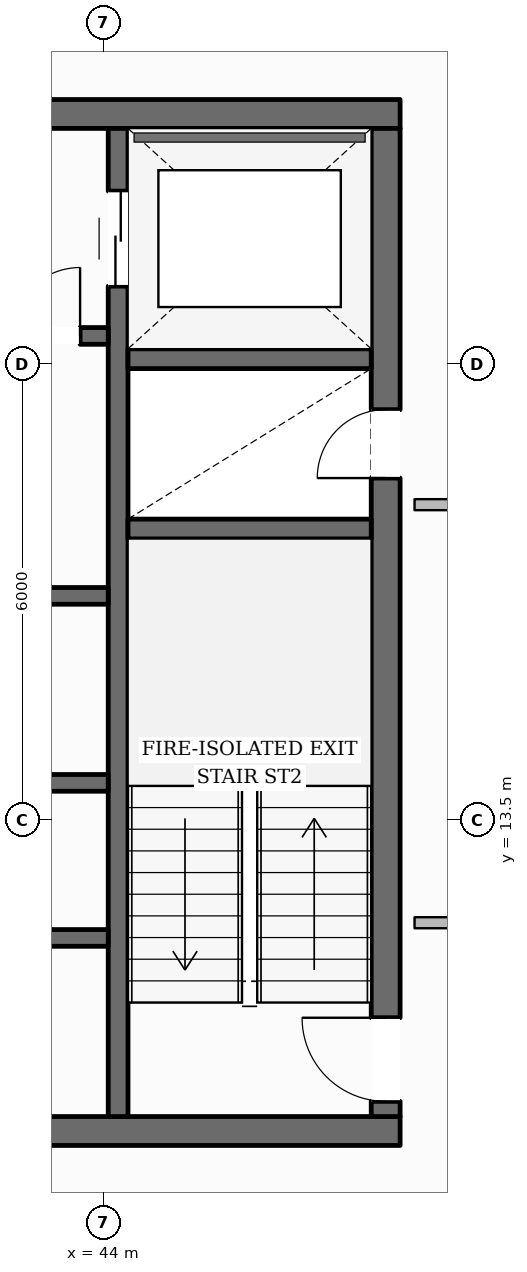
"""IFC4 building model, lengths in metres.
Left out: names, types, materials, properties, quantities, classifications, styles, units other than length and angle.
Written with IfcOpenShell. Run it as: python <this file> out.ifc"""

import sys

from ifc_helpers import new_model, si_unit, direction, frame, frame_2d, origin, place, context, subcontext, project, spatial, rectangle, extrude, element, fill, save


model = new_model("IFC4")
c1 = context("Model", 3, precision=1e-05, world=origin(), true_north=direction((0.0, 1.0)))
c2 = subcontext(c1, "Body", "Model", "MODEL_VIEW")
j1 = project(units=[si_unit("LENGTHUNIT", "METRE"), si_unit("PLANEANGLEUNIT", "RADIAN")], contexts=[c1])
p1 = place(None, origin())
s1 = spatial("IfcSite", under=j1, at=p1, CompositionType="ELEMENT")
p2 = place(p1, origin())
s2 = spatial("IfcBuilding", under=s1, at=p2, CompositionType="ELEMENT")
p3 = place(p2, frame((0.0, 0.0, 243.35)))
s3 = spatial("IfcBuildingStorey", under=s2, at=p3, CompositionType="ELEMENT", Elevation=243.35)
p4 = place(p3, frame((28.1, 9.41, 0.0), z_axis=(0.0, 0.0, 1.0), x_axis=(1.0, 0.0, 0.0)))
e1 = element("IfcWall", 1, at=p4, inside=s3, PredefinedType="SOLIDWALL", context=c2, shape_type="SweptSolid", body=[
    extrude(rectangle(XDim=19.8, YDim=0.38, at=frame_2d((9.9, 0.0))), origin(), (0.0, 0.0, 1.0), 3.61),
])
p5 = place(p4, frame((10.4, 0.0, 0.0)))
e2 = element("IfcOpeningElement", 2, at=p5, cuts=e1, PredefinedType="OPENING", context=c2, shape_type="SweptSolid", body=[
    extrude(rectangle(XDim=1.4, YDim=2.2, at=frame_2d((0.7, 1.1))), frame((0.0, 0.2, 0.0), z_axis=(0.0, -1.0, 0.0), x_axis=(1.0, 0.0, 0.0)), (0.0, 0.0, 1.0), 0.4),
])
p6 = place(p3, frame((28.1, 22.79, 0.0), z_axis=(0.0, 0.0, 1.0), x_axis=(1.0, 0.0, 0.0)))
e3 = element("IfcWall", 3, at=p6, inside=s3, PredefinedType="SOLIDWALL", context=c2, shape_type="SweptSolid", body=[
    extrude(rectangle(XDim=19.8, YDim=0.38, at=frame_2d((9.9, 0.0))), origin(), (0.0, 0.0, 1.0), 3.61),
])
p7 = place(p6, frame((6.175, 0.0, 0.0)))
e4 = element("IfcOpeningElement", 4, at=p7, cuts=e3, PredefinedType="OPENING", context=c2, shape_type="SweptSolid", body=[
    extrude(rectangle(XDim=1.05, YDim=2.15, at=frame_2d((0.525, 1.075))), frame((0.0, 0.2, 0.0), z_axis=(0.0, -1.0, 0.0), x_axis=(1.0, 0.0, 0.0)), (0.0, 0.0, 1.0), 0.4),
])
p8 = place(p6, frame((12.575, 0.0, 0.0)))
e5 = element("IfcOpeningElement", 5, at=p8, cuts=e3, PredefinedType="OPENING", context=c2, shape_type="SweptSolid", body=[
    extrude(rectangle(XDim=1.05, YDim=2.15, at=frame_2d((0.525, 1.075))), frame((0.0, 0.2, 0.0), z_axis=(0.0, -1.0, 0.0), x_axis=(1.0, 0.0, 0.0)), (0.0, 0.0, 1.0), 0.4),
])
p9 = place(p3, frame((47.71, 9.6, 0.0), z_axis=(0.0, 0.0, 1.0), x_axis=(0.0, 1.0, 0.0)))
e6 = element("IfcWall", 6, at=p9, inside=s3, PredefinedType="SOLIDWALL", context=c2, shape_type="SweptSolid", body=[
    extrude(rectangle(XDim=13.0, YDim=0.38, at=frame_2d((6.5, 0.0))), origin(), (0.0, 0.0, 1.0), 3.61),
])
p10 = place(p9, frame((0.2, 0.0, 0.0)))
e7 = element("IfcOpeningElement", 7, at=p10, cuts=e6, PredefinedType="OPENING", context=c2, shape_type="SweptSolid", body=[
    extrude(rectangle(XDim=1.1, YDim=2.15, at=frame_2d((0.55, 1.075))), frame((0.0, 0.2, 0.0), z_axis=(0.0, -1.0, 0.0), x_axis=(1.0, 0.0, 0.0)), (0.0, 0.0, 1.0), 0.4),
])
p11 = place(p9, frame((8.4, 0.0, 0.0)))
e8 = element("IfcOpeningElement", 8, at=p11, cuts=e6, PredefinedType="OPENING", context=c2, shape_type="SweptSolid", body=[
    extrude(rectangle(XDim=0.9, YDim=2.1, at=frame_2d((0.45, 1.05))), frame((0.0, 0.2, 0.0), z_axis=(0.0, -1.0, 0.0), x_axis=(1.0, 0.0, 0.0)), (0.0, 0.0, 1.0), 0.4),
])
p12 = place(p3, frame((44.19, 9.6, 0.0), z_axis=(0.0, 0.0, 1.0), x_axis=(0.0, 1.0, 0.0)))
e9 = element("IfcWall", 9, at=p12, inside=s3, PredefinedType="SHEAR", context=c2, shape_type="SweptSolid", body=[
    extrude(rectangle(XDim=13.0, YDim=0.26, at=frame_2d((6.5, 0.0))), origin(), (0.0, 0.0, 1.0), 3.61),
])
p13 = place(p12, frame((10.925, 0.0, 0.0)))
e10 = element("IfcOpeningElement", 10, at=p13, cuts=e9, PredefinedType="OPENING", context=c2, shape_type="SweptSolid", body=[
    extrude(rectangle(XDim=1.25, YDim=2.25, at=frame_2d((0.625, 1.125))), frame((0.0, 0.14, 0.0), z_axis=(0.0, -1.0, 0.0), x_axis=(1.0, 0.0, 0.0)), (0.0, 0.0, 1.0), 0.28),
])
for number, where, z_axis, x_axis in (
    (11, (44.32, 17.33, 0.0), (0.0, 0.0, 1.0), (1.0, 0.0, 0.0)),
    (12, (44.32, 19.57, 0.0), (0.0, 0.0, 1.0), (1.0, 0.0, 0.0)),
):
    element("IfcWall", number, at=place(p3, frame(where, z_axis=z_axis, x_axis=x_axis)), inside=s3, PredefinedType="SHEAR", context=c2, shape_type="SweptSolid", body=[
        extrude(rectangle(XDim=3.2, YDim=0.26, at=frame_2d((1.6, 0.0))), origin(), (0.0, 0.0, 1.0), 3.61),
    ])
p14 = place(p3, frame((31.94, 19.87, 0.0), z_axis=(0.0, 0.0, 1.0), x_axis=(1.0, 0.0, 0.0)))
e13 = element("IfcWall", 13, at=p14, inside=s3, PredefinedType="SOLIDWALL", context=c2, shape_type="SweptSolid", body=[
    extrude(rectangle(XDim=12.12, YDim=0.22, at=frame_2d((6.06, 0.0))), origin(), (0.0, 0.0, 1.0), 3.61),
])
p15 = place(p14, frame((6.3, 0.0, 0.0)))
e14 = element("IfcOpeningElement", 14, at=p15, cuts=e13, PredefinedType="OPENING", context=c2, shape_type="SweptSolid", body=[
    extrude(rectangle(XDim=1.1, YDim=2.15, at=frame_2d((0.55, 1.075))), frame((0.0, 0.12, 0.0), z_axis=(0.0, -1.0, 0.0), x_axis=(1.0, 0.0, 0.0)), (0.0, 0.0, 1.0), 0.24),
])
p16 = place(p14, frame((8.61, 0.0, 0.0)))
e15 = element("IfcOpeningElement", 15, at=p16, cuts=e13, PredefinedType="OPENING", context=c2, shape_type="SweptSolid", body=[
    extrude(rectangle(XDim=0.9, YDim=2.1, at=frame_2d((0.45, 1.05))), frame((0.0, 0.12, 0.0), z_axis=(0.0, -1.0, 0.0), x_axis=(1.0, 0.0, 0.0)), (0.0, 0.0, 1.0), 0.24),
])
p17 = place(p14, frame((10.85, 0.0, 0.0)))
e16 = element("IfcOpeningElement", 16, at=p17, cuts=e13, PredefinedType="OPENING", context=c2, shape_type="SweptSolid", body=[
    extrude(rectangle(XDim=0.9, YDim=2.1, at=frame_2d((0.45, 1.05))), frame((0.0, 0.12, 0.0), z_axis=(0.0, -1.0, 0.0), x_axis=(1.0, 0.0, 0.0)), (0.0, 0.0, 1.0), 0.24),
])
p18 = place(p3, frame((31.94, 16.45, 0.0), z_axis=(0.0, 0.0, 1.0), x_axis=(1.0, 0.0, 0.0)))
e17 = element("IfcWall", 17, at=p18, inside=s3, PredefinedType="SOLIDWALL", context=c2, shape_type="SweptSolid", body=[
    extrude(rectangle(XDim=12.12, YDim=0.22, at=frame_2d((6.06, 0.0))), origin(), (0.0, 0.0, 1.0), 3.61),
])
p19 = place(p3, frame((31.94, 13.99, 0.0), z_axis=(0.0, 0.0, 1.0), x_axis=(1.0, 0.0, 0.0)))
e18 = element("IfcWall", 18, at=p19, inside=s3, PredefinedType="SOLIDWALL", context=c2, shape_type="SweptSolid", body=[
    extrude(rectangle(XDim=12.12, YDim=0.22, at=frame_2d((6.06, 0.0))), origin(), (0.0, 0.0, 1.0), 3.61),
])
p20 = place(p19, frame((1.11, 0.0, 0.0)))
e19 = element("IfcOpeningElement", 19, at=p20, cuts=e18, PredefinedType="OPENING", context=c2, shape_type="SweptSolid", body=[
    extrude(rectangle(XDim=0.9, YDim=2.1, at=frame_2d((0.45, 1.05))), frame((0.0, 0.12, 0.0), z_axis=(0.0, -1.0, 0.0), x_axis=(1.0, 0.0, 0.0)), (0.0, 0.0, 1.0), 0.24),
])
p21 = place(p19, frame((5.16, 0.0, 0.0)))
e20 = element("IfcOpeningElement", 20, at=p21, cuts=e18, PredefinedType="OPENING", context=c2, shape_type="SweptSolid", body=[
    extrude(rectangle(XDim=0.9, YDim=2.1, at=frame_2d((0.45, 1.05))), frame((0.0, 0.12, 0.0), z_axis=(0.0, -1.0, 0.0), x_axis=(1.0, 0.0, 0.0)), (0.0, 0.0, 1.0), 0.24),
])
p22 = place(p19, frame((9.61, 0.0, 0.0)))
e21 = element("IfcOpeningElement", 21, at=p22, cuts=e18, PredefinedType="OPENING", context=c2, shape_type="SweptSolid", body=[
    extrude(rectangle(XDim=0.9, YDim=2.1, at=frame_2d((0.45, 1.05))), frame((0.0, 0.12, 0.0), z_axis=(0.0, -1.0, 0.0), x_axis=(1.0, 0.0, 0.0)), (0.0, 0.0, 1.0), 0.24),
])
p23 = place(p3, frame((40.28, 11.95, 0.0), z_axis=(0.0, 0.0, 1.0), x_axis=(1.0, 0.0, 0.0)))
e22 = element("IfcWall", 22, at=p23, inside=s3, PredefinedType="SOLIDWALL", context=c2, shape_type="SweptSolid", body=[
    extrude(rectangle(XDim=3.78, YDim=0.22, at=frame_2d((1.89, 0.0))), origin(), (0.0, 0.0, 1.0), 3.61),
])
p24 = place(p23, frame((1.55, 0.0, 0.0)))
e23 = element("IfcOpeningElement", 23, at=p24, cuts=e22, PredefinedType="OPENING", context=c2, shape_type="SweptSolid", body=[
    extrude(rectangle(XDim=0.9, YDim=2.1, at=frame_2d((0.45, 1.05))), frame((0.0, 0.12, 0.0), z_axis=(0.0, -1.0, 0.0), x_axis=(1.0, 0.0, 0.0)), (0.0, 0.0, 1.0), 0.24),
])
p25 = place(p3, frame((41.362, 44.097, 0.0), z_axis=(0.0, 0.0, 1.0), x_axis=(0.497556414716, -0.867431619308, 0.0)))
e24 = element("IfcWall", 24, at=p25, inside=s3, PredefinedType="STANDARD", context=c2, shape_type="SweptSolid", body=[
    extrude(rectangle(XDim=38.118, YDim=0.35, at=frame_2d((19.059, 0.0))), origin(), (0.0, 0.0, 1.0), 3.196),
])
p26 = place(p25, frame((33.873, 0.0, 0.65)))
e25 = element("IfcOpeningElement", 25, at=p26, cuts=e24, PredefinedType="OPENING", context=c2, shape_type="SweptSolid", body=[
    extrude(rectangle(XDim=1.35, YDim=1.75, at=frame_2d((0.675, 0.875))), frame((0.0, 0.185, 0.0), z_axis=(0.0, -1.0, 0.0), x_axis=(1.0, 0.0, 0.0)), (0.0, 0.0, 1.0), 0.37),
])
p27 = place(p25, frame((27.678, 0.0, 0.65)))
e26 = element("IfcOpeningElement", 26, at=p27, cuts=e24, PredefinedType="OPENING", context=c2, shape_type="SweptSolid", body=[
    extrude(rectangle(XDim=1.35, YDim=1.75, at=frame_2d((0.675, 0.875))), frame((0.0, 0.185, 0.0), z_axis=(0.0, -1.0, 0.0), x_axis=(1.0, 0.0, 0.0)), (0.0, 0.0, 1.0), 0.37),
])
p28 = place(p25, frame((15.288, 0.0, 0.65)))
e27 = element("IfcOpeningElement", 27, at=p28, cuts=e24, PredefinedType="OPENING", context=c2, shape_type="SweptSolid", body=[
    extrude(rectangle(XDim=1.35, YDim=1.75, at=frame_2d((0.675, 0.875))), frame((0.0, 0.185, 0.0), z_axis=(0.0, -1.0, 0.0), x_axis=(1.0, 0.0, 0.0)), (0.0, 0.0, 1.0), 0.37),
])
p29 = place(p25, frame((9.093, 0.0, 0.65)))
e28 = element("IfcOpeningElement", 28, at=p29, cuts=e24, PredefinedType="OPENING", context=c2, shape_type="SweptSolid", body=[
    extrude(rectangle(XDim=1.35, YDim=1.75, at=frame_2d((0.675, 0.875))), frame((0.0, 0.185, 0.0), z_axis=(0.0, -1.0, 0.0), x_axis=(1.0, 0.0, 0.0)), (0.0, 0.0, 1.0), 0.37),
])
p30 = place(p25, frame((2.898, 0.0, 0.65)))
e29 = element("IfcOpeningElement", 29, at=p30, cuts=e24, PredefinedType="OPENING", context=c2, shape_type="SweptSolid", body=[
    extrude(rectangle(XDim=1.35, YDim=1.75, at=frame_2d((0.675, 0.875))), frame((0.0, 0.185, 0.0), z_axis=(0.0, -1.0, 0.0), x_axis=(1.0, 0.0, 0.0)), (0.0, 0.0, 1.0), 0.37),
])
for number, where, z_axis, x_axis in (
    (30, (49.91, 17.65, 0.0), (0.0, 0.0, 1.0), (-1.0, 0.0, 0.0)),
    (31, (48.09, 12.15, 0.0), (0.0, 0.0, 1.0), (1.0, 0.0, 0.0)),
):
    element("IfcWall", number, at=place(p3, frame(where, z_axis=z_axis, x_axis=x_axis)), inside=s3, PredefinedType="PARTITIONING", context=c2, shape_type="SweptSolid", body=[
        extrude(rectangle(XDim=1.82, YDim=0.145, at=frame_2d((0.91, 0.0))), origin(), (0.0, 0.0, 1.0), 3.61),
    ])
p31 = place(p10, origin())
e32 = element("IfcDoor", 32, at=p31, inside=s3, OperationType="SINGLE_SWING_RIGHT", PredefinedType="DOOR", context=c2, shape_type="SweptSolid", body=[
    extrude(rectangle(XDim=1.1, YDim=2.15, at=frame_2d((0.55, 1.075))), frame((0.0, 0.025, 0.0), z_axis=(0.0, -1.0, 0.0), x_axis=(1.0, 0.0, 0.0)), (0.0, 0.0, 1.0), 0.05),
])
fill(e7, e32)
p32 = place(p11, origin())
e33 = element("IfcDoor", 33, at=p32, inside=s3, OperationType="SINGLE_SWING_LEFT", PredefinedType="DOOR", context=c2, shape_type="SweptSolid", body=[
    extrude(rectangle(XDim=0.9, YDim=2.1, at=frame_2d((0.45, 1.05))), frame((0.0, 0.025, 0.0), z_axis=(0.0, -1.0, 0.0), x_axis=(1.0, 0.0, 0.0)), (0.0, 0.0, 1.0), 0.05),
])
fill(e8, e33)
p33 = place(p13, origin())
e34 = element("IfcDoor", 34, at=p33, inside=s3, OperationType="DOUBLE_DOOR_SLIDING", PredefinedType="DOOR", context=c2, shape_type="SweptSolid", body=[
    extrude(rectangle(XDim=1.25, YDim=2.25, at=frame_2d((0.625, 1.125))), frame((0.0, 0.025, 0.0), z_axis=(0.0, -1.0, 0.0), x_axis=(1.0, 0.0, 0.0)), (0.0, 0.0, 1.0), 0.05),
])
fill(e10, e34)
p34 = place(p17, origin())
e35 = element("IfcDoor", 35, at=p34, inside=s3, OperationType="SINGLE_SWING_RIGHT", PredefinedType="DOOR", context=c2, shape_type="SweptSolid", body=[
    extrude(rectangle(XDim=0.9, YDim=2.1, at=frame_2d((0.45, 1.05))), frame((0.0, 0.025, 0.0), z_axis=(0.0, -1.0, 0.0), x_axis=(1.0, 0.0, 0.0)), (0.0, 0.0, 1.0), 0.05),
])
fill(e16, e35)
save(model, sys.argv[1])
